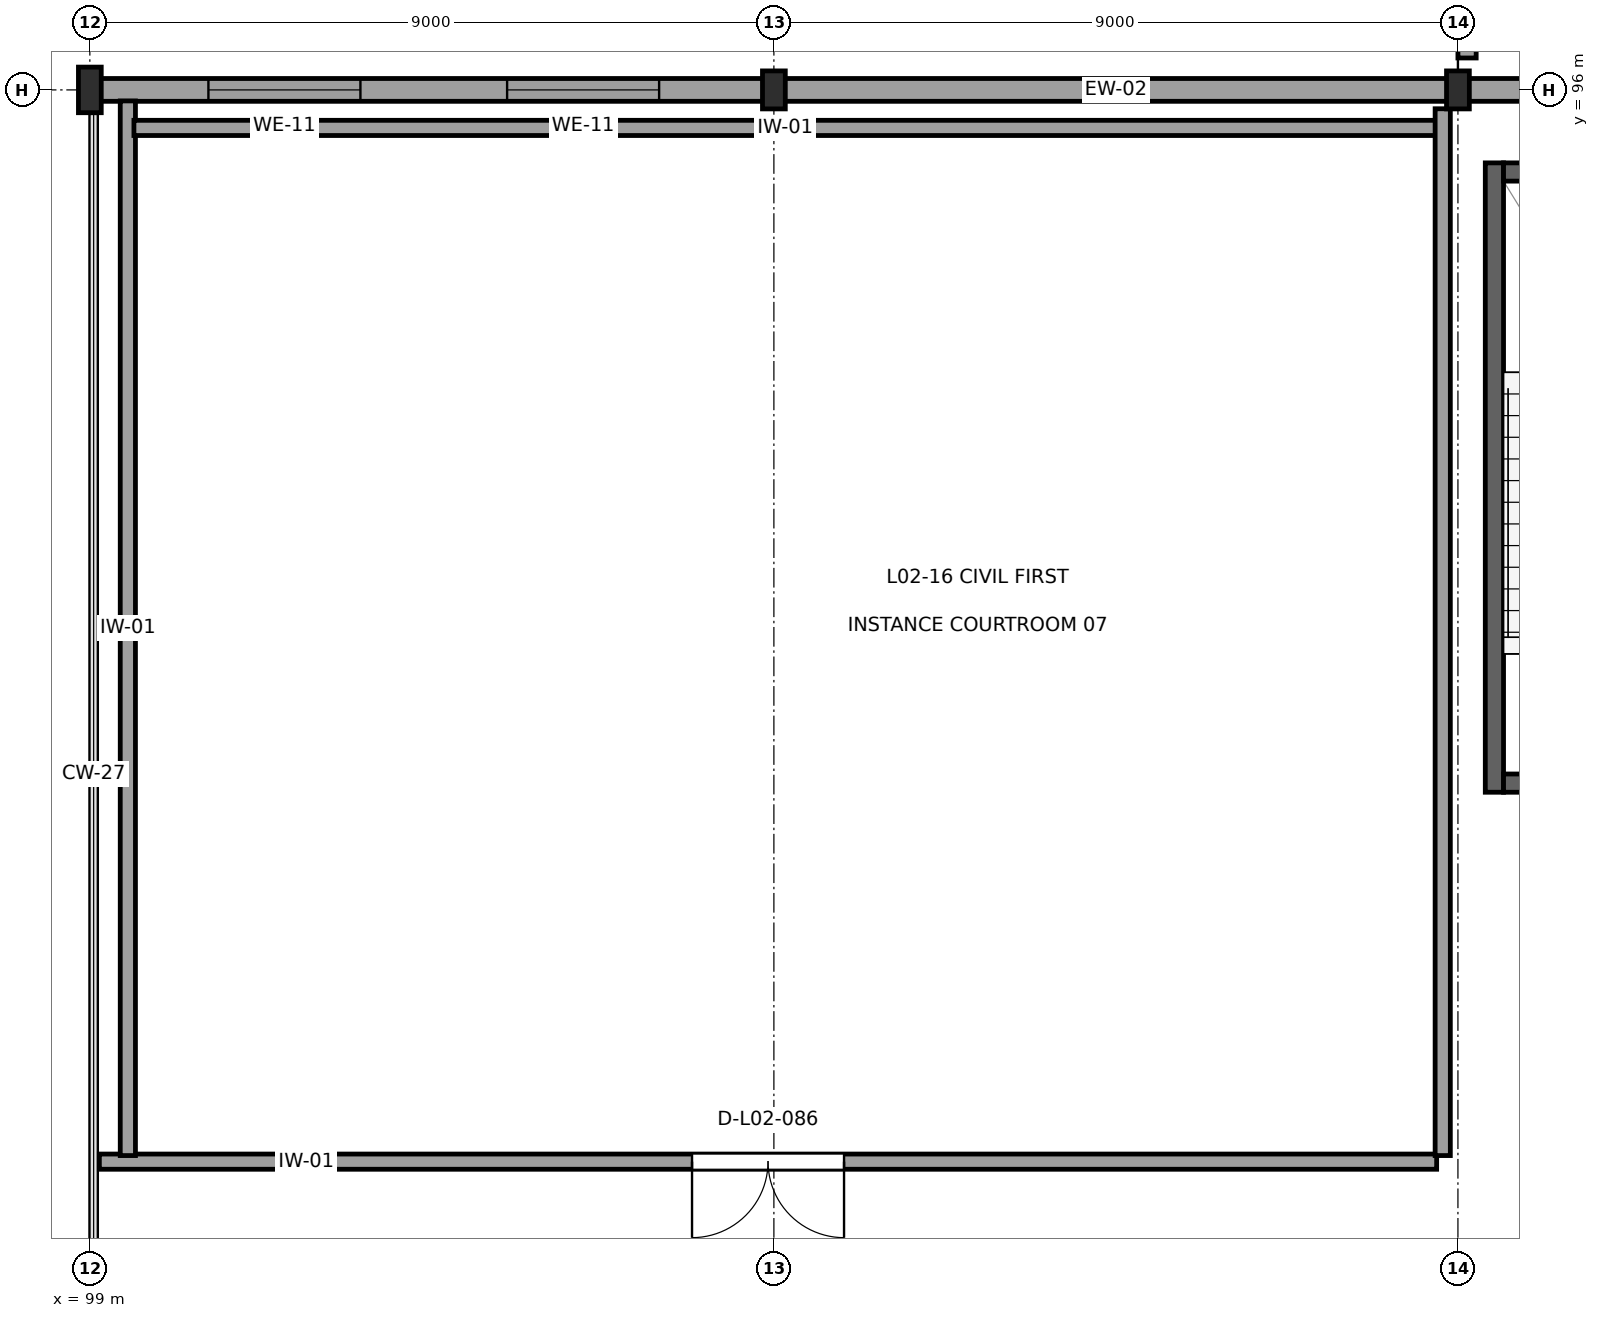
"""IFC4 building model, lengths in metres.
Left out: names, types, materials, properties, quantities, classifications, styles, units other than length and angle.
Written with IfcOpenShell. Run it as: python <this file> out.ifc"""

import sys

from ifc_helpers import new_model, si_unit, direction, frame, frame_2d, origin, origin_2d, place, context, subcontext, project, spatial, rectangle, i_section, extrude, element, fill, save


model = new_model("IFC4")
c1 = context("Model", 3, precision=1e-05, world=origin(), true_north=direction((0.0, 1.0)))
c2 = subcontext(c1, "Body", "Model", "MODEL_VIEW")
j1 = project(units=[si_unit("LENGTHUNIT", "METRE"), si_unit("PLANEANGLEUNIT", "RADIAN")], contexts=[c1])
p1 = place(None, origin())
s1 = spatial("IfcSite", under=j1, at=p1, CompositionType="ELEMENT")
p2 = place(p1, origin())
s2 = spatial("IfcBuilding", under=s1, at=p2, CompositionType="ELEMENT")
p3 = place(p2, frame((0.0, 0.0, 9.9)))
s3 = spatial("IfcBuildingStorey", under=s2, at=p3, CompositionType="ELEMENT", Elevation=9.9)
p4 = place(p3, frame((99.0, 96.0, 0.0), z_axis=(0.0, 0.0, 1.0), x_axis=(1.0, 0.0, 0.0)))
e1 = element("IfcColumn", 1, at=p4, inside=s3, PredefinedType="COLUMN", context=c2, shape_type="SweptSolid", body=[
    extrude(i_section(OverallWidth=0.3, OverallDepth=0.6, WebThickness=0.015, FlangeThickness=0.03, at=origin_2d()), origin(), (0.0, 0.0, 1.0), 4.5),
])
for number, where, z_axis, x_axis in (
    (2, (108.0, 96.0, 0.0), (0.0, 0.0, 1.0), (1.0, 0.0, 0.0)),
    (3, (117.0, 96.0, 0.0), (0.0, 0.0, 1.0), (1.0, 0.0, 0.0)),
):
    element("IfcColumn", number, at=place(p3, frame(where, z_axis=z_axis, x_axis=x_axis)), inside=s3, PredefinedType="COLUMN", context=c2, shape_type="SweptSolid", body=[
        extrude(i_section(OverallWidth=0.3, OverallDepth=0.5, WebThickness=0.014, FlangeThickness=0.028, at=origin_2d()), origin(), (0.0, 0.0, 1.0), 4.5),
    ])
p5 = place(p3, frame((125.727, 96.0, 0.0), z_axis=(0.0, 0.0, 1.0), x_axis=(-1.0, 0.0, 0.0)))
e4 = element("IfcWall", 4, at=p5, inside=s3, PredefinedType="SOLIDWALL", context=c2, shape_type="SweptSolid", body=[
    extrude(rectangle(XDim=8.719, YDim=0.3, at=frame_2d((4.359, 0.0))), origin(), (0.0, 0.0, 1.0), 3.605),
])
p6 = place(p3, frame((116.992, 96.0, 0.0), z_axis=(0.0, 0.0, 1.0), x_axis=(-1.0, 0.0, 0.0)))
e5 = element("IfcWall", 5, at=p6, inside=s3, PredefinedType="SOLIDWALL", context=c2, shape_type="SweptSolid", body=[
    extrude(rectangle(XDim=8.984, YDim=0.3, at=frame_2d((4.492, 0.0))), origin(), (0.0, 0.0, 1.0), 3.605),
])
p7 = place(p3, frame((107.992, 96.0, 0.0), z_axis=(0.0, 0.0, 1.0), x_axis=(-1.0, 0.0, 0.0)))
e6 = element("IfcWall", 6, at=p7, inside=s3, PredefinedType="SOLIDWALL", context=c2, shape_type="SweptSolid", body=[
    extrude(rectangle(XDim=8.934, YDim=0.3, at=frame_2d((4.467, 0.0))), origin(), (0.0, 0.0, 1.0), 3.605),
])
p8 = place(p7, frame((1.502, 0.0, 0.8)))
e7 = element("IfcOpeningElement", 7, at=p8, cuts=e6, PredefinedType="OPENING", context=c2, shape_type="SweptSolid", body=[
    extrude(rectangle(XDim=2.0, YDim=2.0, at=frame_2d((1.0, 1.0))), frame((0.0, 0.165, 0.0), z_axis=(0.0, -1.0, 0.0), x_axis=(1.0, 0.0, 0.0)), (0.0, 0.0, 1.0), 0.33),
])
p9 = place(p7, frame((5.432, 0.0, 0.8)))
e8 = element("IfcOpeningElement", 8, at=p9, cuts=e6, PredefinedType="OPENING", context=c2, shape_type="SweptSolid", body=[
    extrude(rectangle(XDim=2.0, YDim=2.0, at=frame_2d((1.0, 1.0))), frame((0.0, 0.165, 0.0), z_axis=(0.0, -1.0, 0.0), x_axis=(1.0, 0.0, 0.0)), (0.0, 0.0, 1.0), 0.33),
])
p10 = place(p3, frame((117.12, 96.42, 0.0), z_axis=(0.0, 0.0, 1.0), x_axis=(0.0, 1.0, 0.0)))
e9 = element("IfcWall", 9, at=p10, inside=s3, PredefinedType="PARAPET", context=c2, shape_type="SweptSolid", body=[
    extrude(rectangle(XDim=11.52, YDim=0.24, at=frame_2d((5.76, 0.0))), origin(), (0.0, 0.0, 1.0), 1.1),
])
p11 = place(p3, frame((117.48, 86.76, 0.0), z_axis=(0.0, 0.0, 1.0), x_axis=(0.0, 1.0, 0.0)))
e10 = element("IfcWall", 10, at=p11, inside=s3, PredefinedType="SHEAR", context=c2, shape_type="SweptSolid", body=[
    extrude(rectangle(XDim=8.28, YDim=0.24, at=frame_2d((4.14, 0.0))), origin(), (0.0, 0.0, 1.0), 4.31),
])
for number, where, z_axis, x_axis in (
    (11, (117.6, 86.88, 0.0), (0.0, 0.0, 1.0), (1.0, 0.0, 0.0)),
    (12, (117.6, 94.92, 0.0), (0.0, 0.0, 1.0), (1.0, 0.0, 0.0)),
):
    element("IfcWall", number, at=place(p3, frame(where, z_axis=z_axis, x_axis=x_axis)), inside=s3, PredefinedType="SHEAR", context=c2, shape_type="SweptSolid", body=[
        extrude(rectangle(XDim=3.7, YDim=0.24, at=frame_2d((1.85, 0.0))), origin(), (0.0, 0.0, 1.0), 4.31),
    ])
p12 = place(p3, frame((116.72, 81.9, 0.0), z_axis=(0.0, 0.0, 1.0), x_axis=(-1.0, 0.0, 0.0)))
e13 = element("IfcWall", 13, at=p12, inside=s3, PredefinedType="PARTITIONING", context=c2, shape_type="SweptSolid", body=[
    extrude(rectangle(XDim=17.595, YDim=0.2, at=frame_2d((8.797, 0.0))), origin(), (0.0, 0.0, 1.0), 4.14),
])
p13 = place(p12, frame((7.797, 0.0, 0.0)))
e14 = element("IfcOpeningElement", 14, at=p13, cuts=e13, PredefinedType="OPENING", context=c2, shape_type="SweptSolid", body=[
    extrude(rectangle(XDim=2.0, YDim=2.6, at=frame_2d((1.0, 1.3))), frame((0.0, 0.115, 0.0), z_axis=(0.0, -1.0, 0.0), x_axis=(1.0, 0.0, 0.0)), (0.0, 0.0, 1.0), 0.23),
])
p14 = place(p3, frame((99.5, 81.98, 0.0), z_axis=(0.0, 0.0, 1.0), x_axis=(0.0, 1.0, 0.0)))
e15 = element("IfcWall", 15, at=p14, inside=s3, PredefinedType="PARTITIONING", context=c2, shape_type="SweptSolid", body=[
    extrude(rectangle(XDim=13.875, YDim=0.2, at=frame_2d((6.938, 0.0))), origin(), (0.0, 0.0, 1.0), 4.14),
])
p15 = place(p3, frame((99.58, 95.5, 0.0), z_axis=(0.0, 0.0, 1.0), x_axis=(1.0, 0.0, 0.0)))
e16 = element("IfcWall", 16, at=p15, inside=s3, PredefinedType="PARTITIONING", context=c2, shape_type="SweptSolid", body=[
    extrude(rectangle(XDim=17.14, YDim=0.2, at=frame_2d((8.57, 0.0))), origin(), (0.0, 0.0, 1.0), 4.14),
])
p16 = place(p3, frame((116.8, 95.752, 0.0), z_axis=(0.0, 0.0, 1.0), x_axis=(0.0, -1.0, 0.0)))
e17 = element("IfcWall", 17, at=p16, inside=s3, PredefinedType="PARTITIONING", context=c2, shape_type="SweptSolid", body=[
    extrude(rectangle(XDim=13.772, YDim=0.2, at=frame_2d((6.886, 0.0))), origin(), (0.0, 0.0, 1.0), 3.495),
])
p17 = place(p8, origin())
e18 = element("IfcWindow", 18, at=p17, inside=s3, PartitioningType="SINGLE_PANEL", PredefinedType="WINDOW", context=c2, shape_type="SweptSolid", body=[
    extrude(rectangle(XDim=2.0, YDim=2.0, at=frame_2d((1.0, 1.0))), frame((0.0, 0.03, 0.0), z_axis=(0.0, -1.0, 0.0), x_axis=(1.0, 0.0, 0.0)), (0.0, 0.0, 1.0), 0.06),
])
fill(e7, e18)
p18 = place(p9, origin())
e19 = element("IfcWindow", 19, at=p18, inside=s3, PartitioningType="SINGLE_PANEL", PredefinedType="WINDOW", context=c2, shape_type="SweptSolid", body=[
    extrude(rectangle(XDim=2.0, YDim=2.0, at=frame_2d((1.0, 1.0))), frame((0.0, 0.03, 0.0), z_axis=(0.0, -1.0, 0.0), x_axis=(1.0, 0.0, 0.0)), (0.0, 0.0, 1.0), 0.06),
])
fill(e8, e19)
p19 = place(p13, origin())
e20 = element("IfcDoor", 20, at=p19, inside=s3, OperationType="DOUBLE_DOOR_SINGLE_SWING", PredefinedType="DOOR", context=c2, shape_type="SweptSolid", body=[
    extrude(rectangle(XDim=2.0, YDim=2.6, at=frame_2d((1.0, 1.3))), frame((0.0, 0.025, 0.0), z_axis=(0.0, -1.0, 0.0), x_axis=(1.0, 0.0, 0.0)), (0.0, 0.0, 1.0), 0.05),
])
fill(e14, e20)
save(model, sys.argv[1])
